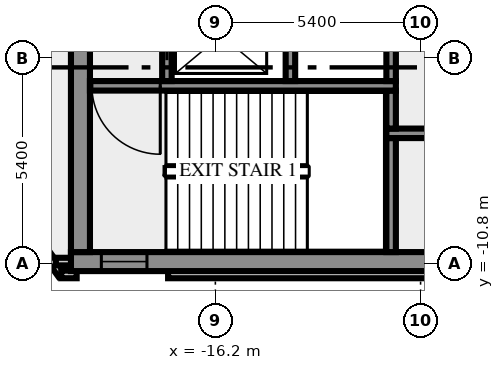
"""IFC4 building model, lengths in metres.
Left out: names, types, materials, properties, quantities, classifications, styles, units other than length and angle.
Written with IfcOpenShell. Run it as: python <this file> out.ifc"""

import sys

from ifc_helpers import new_model, si_unit, direction, frame, frame_2d, origin, place, context, subcontext, project, spatial, rectangle, extrude, element, fill, save


model = new_model("IFC4")
c1 = context("Model", 3, precision=1e-05, world=origin(), true_north=direction((0.0, 1.0)))
c2 = subcontext(c1, "Body", "Model", "MODEL_VIEW")
j1 = project(units=[si_unit("LENGTHUNIT", "METRE"), si_unit("PLANEANGLEUNIT", "RADIAN")], contexts=[c1])
p1 = place(None, origin())
s1 = spatial("IfcSite", under=j1, at=p1, CompositionType="ELEMENT")
p2 = place(p1, origin())
s2 = spatial("IfcBuilding", under=s1, at=p2, CompositionType="ELEMENT")
p3 = place(p2, frame((0.0, 0.0, 180.0)))
s3 = spatial("IfcBuildingStorey", under=s2, at=p3, CompositionType="ELEMENT", Elevation=180.0)
p4 = place(p3, frame((-21.833, -8.909, 0.0), z_axis=(0.0, 0.0, 1.0), x_axis=(0.587766567315, -0.809030569476, 0.0)))
e1 = element("IfcWall", 1, at=p4, inside=s3, PredefinedType="SOLIDWALL", context=c2, shape_type="SweptSolid", body=[
    extrude(rectangle(XDim=2.688, YDim=0.2, at=frame_2d((1.344, 0.0))), origin(), (0.0, 0.0, 1.0), 3.65),
])
p5 = place(p3, frame((-20.256, -11.088, 0.0), z_axis=(0.0, 0.0, 1.0), x_axis=(1.0, 0.0, 0.0)))
e2 = element("IfcWall", 2, at=p5, inside=s3, PredefinedType="SOLIDWALL", context=c2, shape_type="SweptSolid", body=[
    extrude(rectangle(XDim=0.406, YDim=0.2, at=frame_2d((0.203, 0.0))), origin(), (0.0, 0.0, 1.0), 3.65),
])
p6 = place(p3, frame((-17.444, -11.088, 0.0), z_axis=(0.0, 0.0, 1.0), x_axis=(1.0, 0.0, 0.0)))
e3 = element("IfcWall", 3, at=p6, inside=s3, PredefinedType="SOLIDWALL", context=c2, shape_type="SweptSolid", body=[
    extrude(rectangle(XDim=34.888, YDim=0.2, at=frame_2d((17.444, 0.0))), origin(), (0.0, 0.0, 1.0), 3.65),
])
p7 = place(p3, frame((-19.98, -10.75, 0.0), z_axis=(0.0, 0.0, 1.0), x_axis=(-1.0, 0.0, 0.0)))
e4 = element("IfcWall", 4, at=p7, inside=s3, PredefinedType="SOLIDWALL", context=c2, shape_type="SweptSolid", body=[
    extrude(rectangle(XDim=0.417, YDim=0.2, at=frame_2d((0.208, 0.0))), origin(), (0.0, 0.0, 1.0), 3.65),
])
p8 = place(p3, frame((-20.0, -10.75, 0.0), z_axis=(0.0, 0.0, 1.0), x_axis=(1.0, 0.0, 0.0)))
e5 = element("IfcWall", 5, at=p8, inside=s3, PredefinedType="SHEAR", context=c2, shape_type="SweptSolid", body=[
    extrude(rectangle(XDim=40.0, YDim=0.5, at=frame_2d((20.0, 0.0))), origin(), (0.0, 0.0, 1.0), 3.65),
])
p9 = place(p8, frame((0.8, 0.0, 1.0)))
e6 = element("IfcOpeningElement", 6, at=p9, cuts=e5, PredefinedType="OPENING", context=c2, shape_type="SweptSolid", body=[
    extrude(rectangle(XDim=1.2, YDim=1.2, at=frame_2d((0.6, 0.6))), frame((0.0, 0.26, 0.0), z_axis=(0.0, -1.0, 0.0), x_axis=(1.0, 0.0, 0.0)), (0.0, 0.0, 1.0), 0.52),
])
p10 = place(p8, frame((38.0, 0.0, 1.0)))
e7 = element("IfcOpeningElement", 7, at=p10, cuts=e5, PredefinedType="OPENING", context=c2, shape_type="SweptSolid", body=[
    extrude(rectangle(XDim=1.2, YDim=1.2, at=frame_2d((0.6, 0.6))), frame((0.0, 0.26, 0.0), z_axis=(0.0, -1.0, 0.0), x_axis=(1.0, 0.0, 0.0)), (0.0, 0.0, 1.0), 0.52),
])
p11 = place(p3, frame((-19.75, -10.5, 0.0), z_axis=(0.0, 0.0, 1.0), x_axis=(0.0, 1.0, 0.0)))
e8 = element("IfcWall", 8, at=p11, inside=s3, PredefinedType="SHEAR", context=c2, shape_type="SweptSolid", body=[
    extrude(rectangle(XDim=8.8, YDim=0.5, at=frame_2d((4.4, 0.0))), origin(), (0.0, 0.0, 1.0), 3.65),
])
p12 = place(p3, frame((-11.575, -10.5, 0.0), z_axis=(0.0, 0.0, 1.0), x_axis=(0.0, 1.0, 0.0)))
e9 = element("IfcWall", 9, at=p12, inside=s3, PredefinedType="SHEAR", context=c2, shape_type="SweptSolid", body=[
    extrude(rectangle(XDim=3.0, YDim=0.25, at=frame_2d((1.5, 0.0))), origin(), (0.0, 0.0, 1.0), 3.65),
])
p13 = place(p3, frame((11.7, -7.375, 0.0), z_axis=(0.0, 0.0, 1.0), x_axis=(-1.0, 0.0, 0.0)))
e10 = element("IfcWall", 10, at=p13, inside=s3, PredefinedType="SHEAR", context=c2, shape_type="SweptSolid", body=[
    extrude(rectangle(XDim=23.4, YDim=0.25, at=frame_2d((11.7, 0.0))), origin(), (0.0, 0.0, 1.0), 3.65),
])
p14 = place(p13, frame((20.613, 0.0, 0.0)))
e11 = element("IfcOpeningElement", 11, at=p14, cuts=e10, PredefinedType="OPENING", context=c2, shape_type="SweptSolid", body=[
    extrude(rectangle(XDim=0.9, YDim=2.1, at=frame_2d((0.45, 1.05))), frame((0.0, 0.135, 0.0), z_axis=(0.0, -1.0, 0.0), x_axis=(1.0, 0.0, 0.0)), (0.0, 0.0, 1.0), 0.27),
])
p15 = place(p13, frame((16.888, 0.0, 0.0)))
e12 = element("IfcOpeningElement", 12, at=p15, cuts=e10, PredefinedType="OPENING", context=c2, shape_type="SweptSolid", body=[
    extrude(rectangle(XDim=0.9, YDim=2.1, at=frame_2d((0.45, 1.05))), frame((0.0, 0.135, 0.0), z_axis=(0.0, -1.0, 0.0), x_axis=(1.0, 0.0, 0.0)), (0.0, 0.0, 1.0), 0.27),
])
p16 = place(p13, frame((14.25, 0.0, 0.0)))
e13 = element("IfcOpeningElement", 13, at=p16, cuts=e10, PredefinedType="OPENING", context=c2, shape_type="SweptSolid", body=[
    extrude(rectangle(XDim=0.9, YDim=2.1, at=frame_2d((0.45, 1.05))), frame((0.0, 0.135, 0.0), z_axis=(0.0, -1.0, 0.0), x_axis=(1.0, 0.0, 0.0)), (0.0, 0.0, 1.0), 0.27),
])
p17 = place(p13, frame((12.125, 0.0, 0.0)))
e14 = element("IfcOpeningElement", 14, at=p17, cuts=e10, PredefinedType="OPENING", context=c2, shape_type="SweptSolid", body=[
    extrude(rectangle(XDim=0.9, YDim=2.1, at=frame_2d((0.45, 1.05))), frame((0.0, 0.135, 0.0), z_axis=(0.0, -1.0, 0.0), x_axis=(1.0, 0.0, 0.0)), (0.0, 0.0, 1.0), 0.27),
])
p18 = place(p13, frame((10.45, 0.0, 0.0)))
e15 = element("IfcOpeningElement", 15, at=p18, cuts=e10, PredefinedType="OPENING", context=c2, shape_type="SweptSolid", body=[
    extrude(rectangle(XDim=0.75, YDim=2.1, at=frame_2d((0.375, 1.05))), frame((0.0, 0.135, 0.0), z_axis=(0.0, -1.0, 0.0), x_axis=(1.0, 0.0, 0.0)), (0.0, 0.0, 1.0), 0.27),
])
p19 = place(p13, frame((8.35, 0.0, 0.0)))
e16 = element("IfcOpeningElement", 16, at=p19, cuts=e10, PredefinedType="OPENING", context=c2, shape_type="SweptSolid", body=[
    extrude(rectangle(XDim=1.1, YDim=2.1, at=frame_2d((0.55, 1.05))), frame((0.0, 0.135, 0.0), z_axis=(0.0, -1.0, 0.0), x_axis=(1.0, 0.0, 0.0)), (0.0, 0.0, 1.0), 0.27),
])
p20 = place(p13, frame((5.85, 0.0, 0.0)))
e17 = element("IfcOpeningElement", 17, at=p20, cuts=e10, PredefinedType="OPENING", context=c2, shape_type="SweptSolid", body=[
    extrude(rectangle(XDim=1.1, YDim=2.1, at=frame_2d((0.55, 1.05))), frame((0.0, 0.135, 0.0), z_axis=(0.0, -1.0, 0.0), x_axis=(1.0, 0.0, 0.0)), (0.0, 0.0, 1.0), 0.27),
])
p21 = place(p13, frame((3.35, 0.0, 0.0)))
e18 = element("IfcOpeningElement", 18, at=p21, cuts=e10, PredefinedType="OPENING", context=c2, shape_type="SweptSolid", body=[
    extrude(rectangle(XDim=1.1, YDim=2.1, at=frame_2d((0.55, 1.05))), frame((0.0, 0.135, 0.0), z_axis=(0.0, -1.0, 0.0), x_axis=(1.0, 0.0, 0.0)), (0.0, 0.0, 1.0), 0.27),
])
p22 = place(p13, frame((0.85, 0.0, 0.0)))
e19 = element("IfcOpeningElement", 19, at=p22, cuts=e10, PredefinedType="OPENING", context=c2, shape_type="SweptSolid", body=[
    extrude(rectangle(XDim=1.1, YDim=2.1, at=frame_2d((0.55, 1.05))), frame((0.0, 0.135, 0.0), z_axis=(0.0, -1.0, 0.0), x_axis=(1.0, 0.0, 0.0)), (0.0, 0.0, 1.0), 0.27),
])
p23 = place(p3, frame((-11.575, -7.25, 0.0), z_axis=(0.0, 0.0, 1.0), x_axis=(0.0, 1.0, 0.0)))
e20 = element("IfcWall", 20, at=p23, inside=s3, PredefinedType="SHEAR", context=c2, shape_type="SweptSolid", body=[
    extrude(rectangle(XDim=1.0, YDim=0.25, at=frame_2d((0.5, 0.0))), origin(), (0.0, 0.0, 1.0), 3.65),
])
p24 = place(p3, frame((-11.45, -6.125, 0.0), z_axis=(0.0, 0.0, 1.0), x_axis=(-1.0, 0.0, 0.0)))
e21 = element("IfcWall", 21, at=p24, inside=s3, PredefinedType="SHEAR", context=c2, shape_type="SweptSolid", body=[
    extrude(rectangle(XDim=8.05, YDim=0.25, at=frame_2d((4.025, 0.0))), origin(), (0.0, 0.0, 1.0), 3.65),
])
p25 = place(p24, frame((6.2, 0.0, 0.0)))
e22 = element("IfcOpeningElement", 22, at=p25, cuts=e21, PredefinedType="OPENING", context=c2, shape_type="SweptSolid", body=[
    extrude(rectangle(XDim=1.8, YDim=2.1, at=frame_2d((0.9, 1.05))), frame((0.0, 0.135, 0.0), z_axis=(0.0, -1.0, 0.0), x_axis=(1.0, 0.0, 0.0)), (0.0, 0.0, 1.0), 0.27),
])
p26 = place(p3, frame((-17.475, -6.0, 0.0), z_axis=(0.0, 0.0, 1.0), x_axis=(0.0, 1.0, 0.0)))
e23 = element("IfcWall", 23, at=p26, inside=s3, PredefinedType="SHEAR", context=c2, shape_type="SweptSolid", body=[
    extrude(rectangle(XDim=4.3, YDim=0.25, at=frame_2d((2.15, 0.0))), origin(), (0.0, 0.0, 1.0), 3.65),
])
p27 = place(p26, frame((0.55, 0.0, 0.0)))
e24 = element("IfcOpeningElement", 24, at=p27, cuts=e23, PredefinedType="OPENING", context=c2, shape_type="SweptSolid", body=[
    extrude(rectangle(XDim=1.3, YDim=2.1, at=frame_2d((0.65, 1.05))), frame((0.0, 0.135, 0.0), z_axis=(0.0, -1.0, 0.0), x_axis=(1.0, 0.0, 0.0)), (0.0, 0.0, 1.0), 0.27),
])
p28 = place(p3, frame((-14.225, -6.0, 0.0), z_axis=(0.0, 0.0, 1.0), x_axis=(0.0, 1.0, 0.0)))
e25 = element("IfcWall", 25, at=p28, inside=s3, PredefinedType="SHEAR", context=c2, shape_type="SweptSolid", body=[
    extrude(rectangle(XDim=4.3, YDim=0.25, at=frame_2d((2.15, 0.0))), origin(), (0.0, 0.0, 1.0), 3.65),
])
p29 = place(p3, frame((-11.575, -6.0, 0.0), z_axis=(0.0, 0.0, 1.0), x_axis=(0.0, 1.0, 0.0)))
e26 = element("IfcWall", 26, at=p29, inside=s3, PredefinedType="SHEAR", context=c2, shape_type="SweptSolid", body=[
    extrude(rectangle(XDim=1.75, YDim=0.25, at=frame_2d((0.875, 0.0))), origin(), (0.0, 0.0, 1.0), 3.65),
])
p30 = place(p9, origin())
e27 = element("IfcWindow", 27, at=p30, inside=s3, PartitioningType="SINGLE_PANEL", PredefinedType="WINDOW", context=c2, shape_type="SweptSolid", body=[
    extrude(rectangle(XDim=1.2, YDim=1.2, at=frame_2d((0.6, 0.6))), frame((0.0, 0.03, 0.0), z_axis=(0.0, -1.0, 0.0), x_axis=(1.0, 0.0, 0.0)), (0.0, 0.0, 1.0), 0.06),
])
fill(e6, e27)
p31 = place(p25, origin())
e28 = element("IfcDoor", 28, at=p31, inside=s3, OperationType="DOUBLE_DOOR_SINGLE_SWING", PredefinedType="DOOR", context=c2, shape_type="SweptSolid", body=[
    extrude(rectangle(XDim=1.8, YDim=2.1, at=frame_2d((0.9, 1.05))), frame((0.0, 0.025, 0.0), z_axis=(0.0, -1.0, 0.0), x_axis=(1.0, 0.0, 0.0)), (0.0, 0.0, 1.0), 0.05),
])
fill(e22, e28)
p32 = place(p27, origin())
e29 = element("IfcDoor", 29, at=p32, inside=s3, OperationType="DOUBLE_DOOR_SLIDING", PredefinedType="DOOR", context=c2, shape_type="SweptSolid", body=[
    extrude(rectangle(XDim=1.3, YDim=2.1, at=frame_2d((0.65, 1.05))), frame((0.0, 0.025, 0.0), z_axis=(0.0, -1.0, 0.0), x_axis=(1.0, 0.0, 0.0)), (0.0, 0.0, 1.0), 0.05),
])
fill(e24, e29)
save(model, sys.argv[1])
